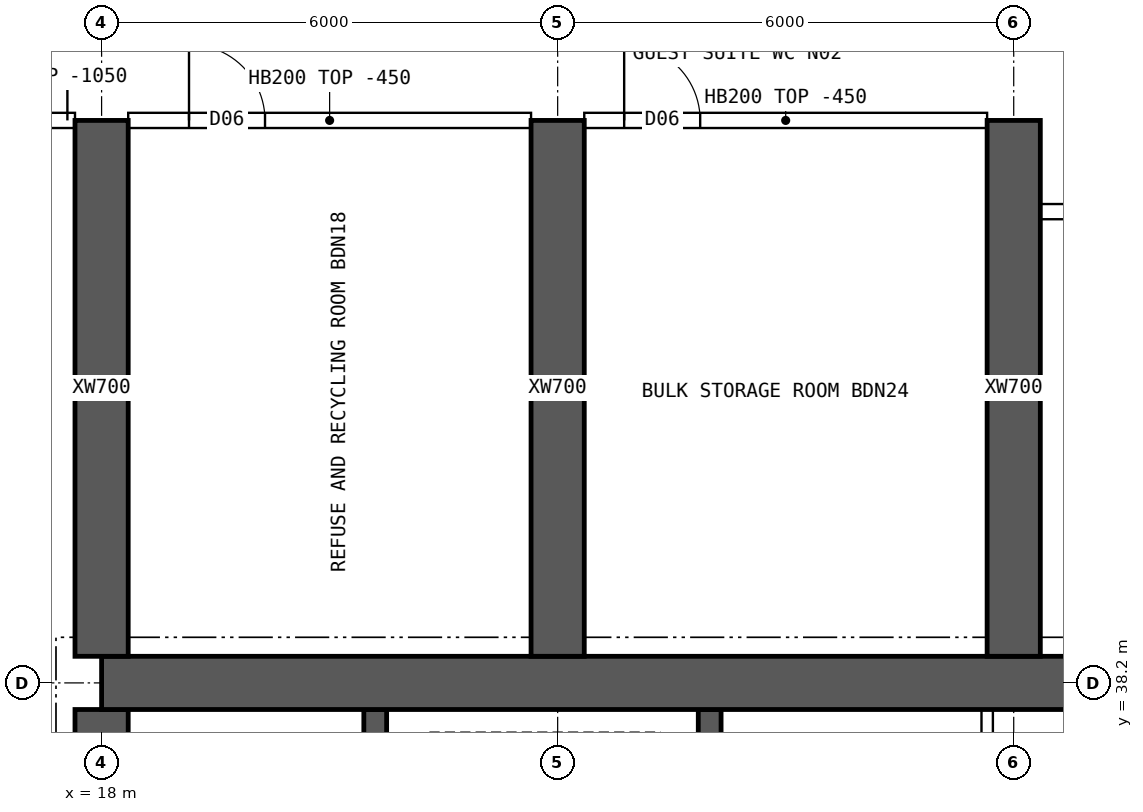
"""IFC4 building model, lengths in metres.
Left out: names, types, materials, properties, quantities, classifications, styles, units other than length and angle.
Written with IfcOpenShell. Run it as: python <this file> out.ifc"""

import sys

from ifc_helpers import new_model, si_unit, direction, frame, frame_2d, origin, place, context, subcontext, project, spatial, rectangle, extrude, element, fill, save


model = new_model("IFC4")
c1 = context("Model", 3, precision=1e-05, world=origin(), true_north=direction((0.0, 1.0)))
c2 = subcontext(c1, "Body", "Model", "MODEL_VIEW")
j1 = project(units=[si_unit("LENGTHUNIT", "METRE"), si_unit("PLANEANGLEUNIT", "RADIAN")], contexts=[c1])
p1 = place(None, origin())
s1 = spatial("IfcSite", under=j1, at=p1, CompositionType="ELEMENT")
p2 = place(p1, origin())
s2 = spatial("IfcBuilding", under=s1, at=p2, CompositionType="ELEMENT")
p3 = place(p2, frame((0.0, 0.0, 242.8)))
s3 = spatial("IfcBuildingStorey", under=s2, at=p3, CompositionType="ELEMENT", Elevation=242.8)
p4 = place(p3, frame((18.0, 38.2, 0.0), z_axis=(0.0, 0.0, 1.0), x_axis=(1.0, 0.0, 0.0)))
e1 = element("IfcWall", 1, at=p4, inside=s3, PredefinedType="SHEAR", context=c2, shape_type="SweptSolid", body=[
    extrude(rectangle(XDim=48.0, YDim=0.7, at=frame_2d((24.0, 0.0))), origin(), (0.0, 0.0, 1.0), 3.75),
])
p5 = place(p3, frame((18.0, 26.15, 0.0), z_axis=(0.0, 0.0, 1.0), x_axis=(0.0, 1.0, 0.0)))
e2 = element("IfcWall", 2, at=p5, inside=s3, PredefinedType="SHEAR", context=c2, shape_type="SweptSolid", body=[
    extrude(rectangle(XDim=11.7, YDim=0.7, at=frame_2d((5.85, 0.0))), origin(), (0.0, 0.0, 1.0), 3.75),
])
p6 = place(p5, frame((5.15, 0.0, 0.0)))
e3 = element("IfcOpeningElement", 3, at=p6, cuts=e2, PredefinedType="OPENING", context=c2, shape_type="SweptSolid", body=[
    extrude(rectangle(XDim=1.2, YDim=2.1, at=frame_2d((0.6, 1.05))), frame((0.0, 0.36, 0.0), z_axis=(0.0, -1.0, 0.0), x_axis=(1.0, 0.0, 0.0)), (0.0, 0.0, 1.0), 0.72),
])
for number, where, z_axis, x_axis in (
    (4, (21.6, 34.75, 0.0), (0.0, 0.0, 1.0), (0.0, 1.0, 0.0)),
    (5, (26.0, 34.75, 0.0), (0.0, 0.0, 1.0), (0.0, 1.0, 0.0)),
):
    element("IfcWall", number, at=place(p3, frame(where, z_axis=z_axis, x_axis=x_axis)), inside=s3, PredefinedType="SHEAR", context=c2, shape_type="SweptSolid", body=[
        extrude(rectangle(XDim=3.1, YDim=0.3, at=frame_2d((1.55, 0.0))), origin(), (0.0, 0.0, 1.0), 3.75),
    ])
for number, where, z_axis, x_axis in (
    (6, (18.0, 38.55, 0.0), (0.0, 0.0, 1.0), (0.0, 1.0, 0.0)),
    (7, (24.0, 38.55, 0.0), (0.0, 0.0, 1.0), (0.0, 1.0, 0.0)),
    (8, (30.0, 38.55, 0.0), (0.0, 0.0, 1.0), (0.0, 1.0, 0.0)),
):
    element("IfcWall", number, at=place(p3, frame(where, z_axis=z_axis, x_axis=x_axis)), inside=s3, PredefinedType="SHEAR", context=c2, shape_type="SweptSolid", body=[
        extrude(rectangle(XDim=7.05, YDim=0.7, at=frame_2d((3.525, 0.0))), origin(), (0.0, 0.0, 1.0), 3.75),
    ])
p7 = place(p3, frame((29.651, 34.75, 0.0), z_axis=(0.0, 0.0, 1.0), x_axis=(0.0, 1.0, 0.0)))
e9 = element("IfcWall", 9, at=p7, inside=s3, PredefinedType="SOLIDWALL", context=c2, shape_type="SweptSolid", body=[
    extrude(rectangle(XDim=3.1, YDim=0.15, at=frame_2d((1.55, 0.0))), origin(), (0.0, 0.0, 1.0), 3.3),
])
p8 = place(p3, frame((15.6, 45.6, 0.0), z_axis=(0.0, 0.0, 1.0), x_axis=(1.0, 0.0, 0.0)))
e10 = element("IfcWall", 10, at=p8, inside=s3, PredefinedType="SOLIDWALL", context=c2, shape_type="SweptSolid", body=[
    extrude(rectangle(XDim=2.05, YDim=0.2, at=frame_2d((1.025, 0.0))), origin(), (0.0, 0.0, 1.0), 2.7),
])
p9 = place(p8, frame((0.75, 0.0, 0.0)))
e11 = element("IfcOpeningElement", 11, at=p9, cuts=e10, PredefinedType="OPENING", context=c2, shape_type="SweptSolid", body=[
    extrude(rectangle(XDim=1.2, YDim=2.1, at=frame_2d((0.6, 1.05))), frame((0.0, 0.11, 0.0), z_axis=(0.0, -1.0, 0.0), x_axis=(1.0, 0.0, 0.0)), (0.0, 0.0, 1.0), 0.22),
])
p10 = place(p3, frame((18.35, 45.6, 0.0), z_axis=(0.0, 0.0, 1.0), x_axis=(1.0, 0.0, 0.0)))
e12 = element("IfcWall", 12, at=p10, inside=s3, PredefinedType="SOLIDWALL", context=c2, shape_type="SweptSolid", body=[
    extrude(rectangle(XDim=5.3, YDim=0.2, at=frame_2d((2.65, 0.0))), origin(), (0.0, 0.0, 1.0), 3.3),
])
p11 = place(p10, frame((0.8, 0.0, 0.0)))
e13 = element("IfcOpeningElement", 13, at=p11, cuts=e12, PredefinedType="OPENING", context=c2, shape_type="SweptSolid", body=[
    extrude(rectangle(XDim=1.0, YDim=2.1, at=frame_2d((0.5, 1.05))), frame((0.0, 0.11, 0.0), z_axis=(0.0, -1.0, 0.0), x_axis=(1.0, 0.0, 0.0)), (0.0, 0.0, 1.0), 0.22),
])
p12 = place(p3, frame((24.35, 45.6, 0.0), z_axis=(0.0, 0.0, 1.0), x_axis=(1.0, 0.0, 0.0)))
e14 = element("IfcWall", 14, at=p12, inside=s3, PredefinedType="SOLIDWALL", context=c2, shape_type="SweptSolid", body=[
    extrude(rectangle(XDim=5.3, YDim=0.2, at=frame_2d((2.65, 0.0))), origin(), (0.0, 0.0, 1.0), 3.3),
])
p13 = place(p12, frame((0.525, 0.0, 0.0)))
e15 = element("IfcOpeningElement", 15, at=p13, cuts=e14, PredefinedType="OPENING", context=c2, shape_type="SweptSolid", body=[
    extrude(rectangle(XDim=1.0, YDim=2.1, at=frame_2d((0.5, 1.05))), frame((0.0, 0.11, 0.0), z_axis=(0.0, -1.0, 0.0), x_axis=(1.0, 0.0, 0.0)), (0.0, 0.0, 1.0), 0.22),
])
p14 = place(p3, frame((30.35, 44.4, 0.0), z_axis=(0.0, 0.0, 1.0), x_axis=(1.0, 0.0, 0.0)))
e16 = element("IfcWall", 16, at=p14, inside=s3, PredefinedType="SOLIDWALL", context=c2, shape_type="SweptSolid", body=[
    extrude(rectangle(XDim=5.3, YDim=0.2, at=frame_2d((2.65, 0.0))), origin(), (0.0, 0.0, 1.0), 3.3),
])
p15 = place(p14, frame((0.8, 0.0, 0.0)))
e17 = element("IfcOpeningElement", 17, at=p15, cuts=e16, PredefinedType="OPENING", context=c2, shape_type="SweptSolid", body=[
    extrude(rectangle(XDim=1.0, YDim=2.1, at=frame_2d((0.5, 1.05))), frame((0.0, 0.11, 0.0), z_axis=(0.0, -1.0, 0.0), x_axis=(1.0, 0.0, 0.0)), (0.0, 0.0, 1.0), 0.22),
])
p16 = place(p9, origin())
e18 = element("IfcDoor", 18, at=p16, inside=s3, OperationType="DOUBLE_DOOR_SINGLE_SWING", PredefinedType="DOOR", context=c2, shape_type="SweptSolid", body=[
    extrude(rectangle(XDim=1.2, YDim=2.1, at=frame_2d((0.6, 1.05))), frame((0.0, 0.025, 0.0), z_axis=(0.0, -1.0, 0.0), x_axis=(1.0, 0.0, 0.0)), (0.0, 0.0, 1.0), 0.05),
])
fill(e11, e18)
p17 = place(p11, origin())
e19 = element("IfcDoor", 19, at=p17, inside=s3, OperationType="SINGLE_SWING_LEFT", PredefinedType="DOOR", context=c2, shape_type="SweptSolid", body=[
    extrude(rectangle(XDim=1.0, YDim=2.1, at=frame_2d((0.5, 1.05))), frame((0.0, 0.025, 0.0), z_axis=(0.0, -1.0, 0.0), x_axis=(1.0, 0.0, 0.0)), (0.0, 0.0, 1.0), 0.05),
])
fill(e13, e19)
p18 = place(p13, origin())
e20 = element("IfcDoor", 20, at=p18, inside=s3, OperationType="SINGLE_SWING_LEFT", PredefinedType="DOOR", context=c2, shape_type="SweptSolid", body=[
    extrude(rectangle(XDim=1.0, YDim=2.1, at=frame_2d((0.5, 1.05))), frame((0.0, 0.025, 0.0), z_axis=(0.0, -1.0, 0.0), x_axis=(1.0, 0.0, 0.0)), (0.0, 0.0, 1.0), 0.05),
])
fill(e15, e20)
save(model, sys.argv[1])
